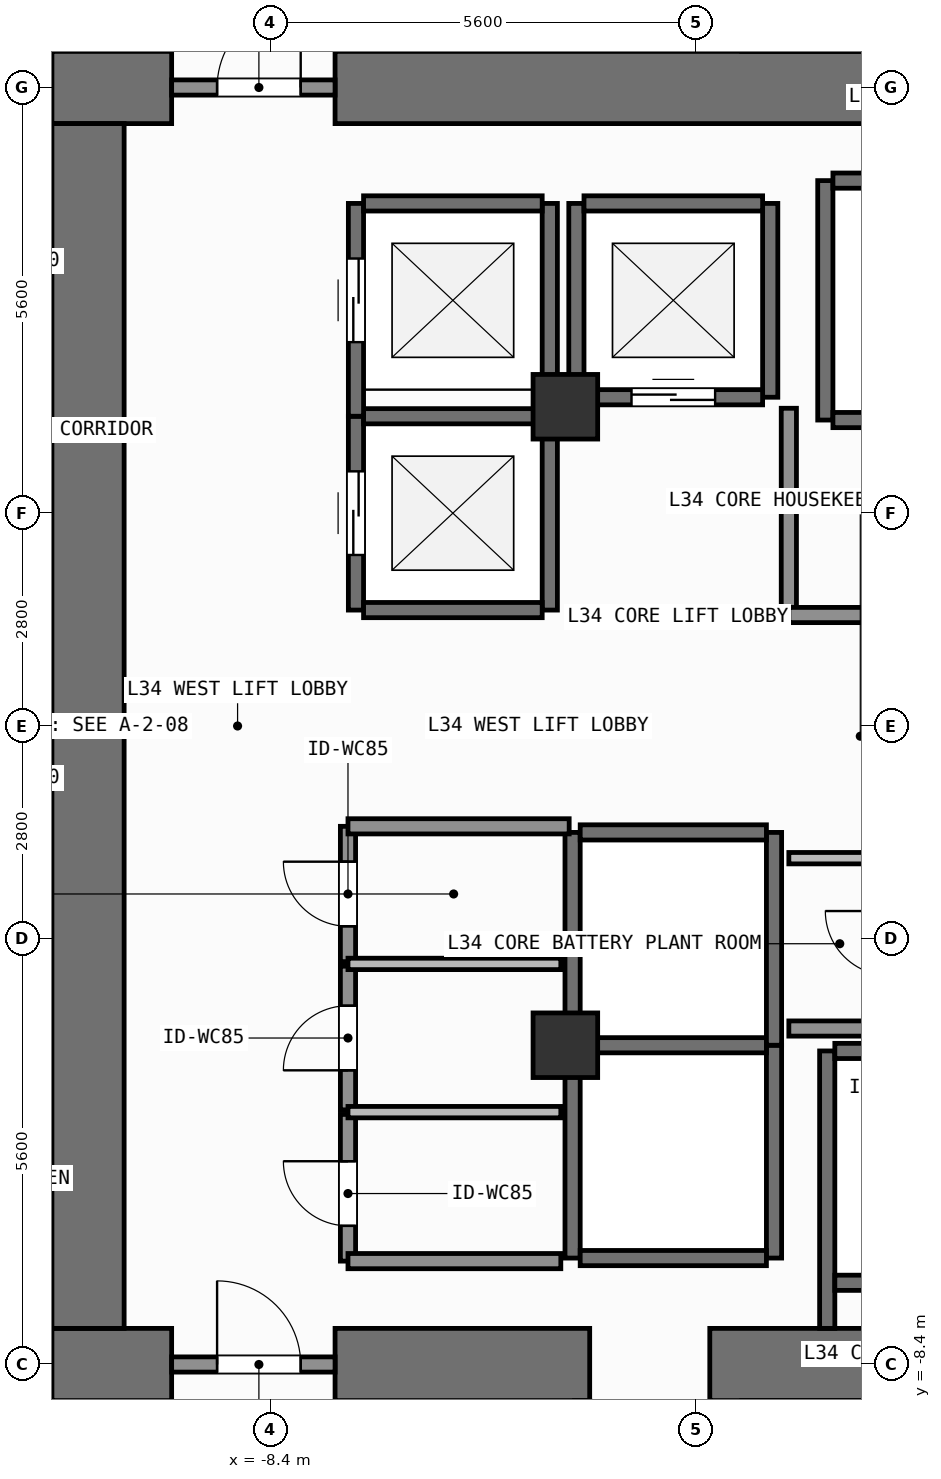
"""IFC4 building model, lengths in metres.
Left out: names, types, materials, properties, quantities, classifications, styles, units other than length and angle.
Written with IfcOpenShell. Run it as: python <this file> out.ifc"""

import sys

from ifc_helpers import new_model, si_unit, direction, frame, frame_2d, origin, origin_2d, place, context, subcontext, project, spatial, rectangle, extrude, element, fill, save


model = new_model("IFC4")
c1 = context("Model", 3, precision=1e-05, world=origin(), true_north=direction((0.0, 1.0)))
c2 = subcontext(c1, "Body", "Model", "MODEL_VIEW")
j1 = project(units=[si_unit("LENGTHUNIT", "METRE"), si_unit("PLANEANGLEUNIT", "RADIAN")], contexts=[c1])
p1 = place(None, origin())
s1 = spatial("IfcSite", under=j1, at=p1, CompositionType="ELEMENT")
p2 = place(p1, origin())
s2 = spatial("IfcBuilding", under=s1, at=p2, CompositionType="ELEMENT")
p3 = place(p2, frame((0.0, 0.0, 136.8)))
s3 = spatial("IfcBuildingStorey", under=s2, at=p3, CompositionType="ELEMENT", Elevation=136.8)
p4 = place(p3, frame((-11.275, -8.4, 0.0), z_axis=(0.0, 0.0, 1.0), x_axis=(1.0, 0.0, 0.0)))
e1 = element("IfcWall", 1, at=p4, inside=s3, PredefinedType="SHEAR", context=c2, shape_type="SweptSolid", body=[
    extrude(rectangle(XDim=1.575, YDim=0.95, at=frame_2d((0.788, 0.0))), origin(), (0.0, 0.0, 1.0), 3.9),
])
p5 = place(p3, frame((-7.55, -8.4, 0.0), z_axis=(0.0, 0.0, 1.0), x_axis=(1.0, 0.0, 0.0)))
e2 = element("IfcWall", 2, at=p5, inside=s3, PredefinedType="SHEAR", context=c2, shape_type="SweptSolid", body=[
    extrude(rectangle(XDim=3.35, YDim=0.95, at=frame_2d((1.675, 0.0))), origin(), (0.0, 0.0, 1.0), 3.9),
])
p6 = place(p3, frame((-2.62, -8.4, 0.0), z_axis=(0.0, 0.0, 1.0), x_axis=(1.0, 0.0, 0.0)))
e3 = element("IfcWall", 3, at=p6, inside=s3, PredefinedType="SHEAR", context=c2, shape_type="SweptSolid", body=[
    extrude(rectangle(XDim=7.27, YDim=0.95, at=frame_2d((3.635, 0.0))), origin(), (0.0, 0.0, 1.0), 3.9),
])
p7 = place(p3, frame((-11.275, 8.4, 0.0), z_axis=(0.0, 0.0, 1.0), x_axis=(1.0, 0.0, 0.0)))
e4 = element("IfcWall", 4, at=p7, inside=s3, PredefinedType="SHEAR", context=c2, shape_type="SweptSolid", body=[
    extrude(rectangle(XDim=1.575, YDim=0.95, at=frame_2d((0.788, 0.0))), origin(), (0.0, 0.0, 1.0), 3.9),
])
p8 = place(p3, frame((-7.55, 8.4, 0.0), z_axis=(0.0, 0.0, 1.0), x_axis=(1.0, 0.0, 0.0)))
e5 = element("IfcWall", 5, at=p8, inside=s3, PredefinedType="SHEAR", context=c2, shape_type="SweptSolid", body=[
    extrude(rectangle(XDim=16.425, YDim=0.95, at=frame_2d((8.212, 0.0))), origin(), (0.0, 0.0, 1.0), 3.9),
])
p9 = place(p3, frame((-10.8, -7.925, 0.0), z_axis=(0.0, 0.0, 1.0), x_axis=(0.0, 1.0, 0.0)))
e6 = element("IfcWall", 6, at=p9, inside=s3, PredefinedType="SHEAR", context=c2, shape_type="SweptSolid", body=[
    extrude(rectangle(XDim=15.85, YDim=0.95, at=frame_2d((7.925, 0.0))), origin(), (0.0, 0.0, 1.0), 3.9),
])
for number, where, z_axis, x_axis in (
    (7, (-4.52, -4.2, 0.0), (0.0, 0.0, 1.0), (1.0, 0.0, 0.0)),
    (8, (-4.52, 4.2, 0.0), (0.0, 0.0, 1.0), (1.0, 0.0, 0.0)),
):
    element("IfcColumn", number, at=place(p3, frame(where, z_axis=z_axis, x_axis=x_axis)), inside=s3, PredefinedType="COLUMN", context=c2, shape_type="SweptSolid", body=[
        extrude(rectangle(XDim=0.85, YDim=0.85, at=origin_2d()), origin(), (0.0, 0.0, 1.0), 3.9),
    ])
p10 = place(p3, frame((-7.275, 1.525, 0.0), z_axis=(0.0, 0.0, 1.0), x_axis=(0.0, 1.0, 0.0)))
e9 = element("IfcWall", 9, at=p10, inside=s3, PredefinedType="SHEAR", context=c2, shape_type="SweptSolid", body=[
    extrude(rectangle(XDim=2.55, YDim=0.2, at=frame_2d((1.275, 0.0))), origin(), (0.0, 0.0, 1.0), 3.68),
])
p11 = place(p10, frame((0.725, 0.0, 0.0)))
e10 = element("IfcOpeningElement", 10, at=p11, cuts=e9, PredefinedType="OPENING", context=c2, shape_type="SweptSolid", body=[
    extrude(rectangle(XDim=1.1, YDim=2.2, at=frame_2d((0.55, 1.1))), frame((0.0, 0.11, 0.0), z_axis=(0.0, -1.0, 0.0), x_axis=(1.0, 0.0, 0.0)), (0.0, 0.0, 1.0), 0.22),
])
p12 = place(p3, frame((-4.725, 1.525, 0.0), z_axis=(0.0, 0.0, 1.0), x_axis=(0.0, 1.0, 0.0)))
e11 = element("IfcWall", 11, at=p12, inside=s3, PredefinedType="SHEAR", context=c2, shape_type="SweptSolid", body=[
    extrude(rectangle(XDim=2.55, YDim=0.2, at=frame_2d((1.275, 0.0))), origin(), (0.0, 0.0, 1.0), 3.68),
])
for number, where, z_axis, x_axis in (
    (12, (-7.175, 1.525, 0.0), (0.0, 0.0, 1.0), (1.0, 0.0, 0.0)),
    (13, (-7.175, 4.075, 0.0), (0.0, 0.0, 1.0), (1.0, 0.0, 0.0)),
):
    element("IfcWall", number, at=place(p3, frame(where, z_axis=z_axis, x_axis=x_axis)), inside=s3, PredefinedType="SHEAR", context=c2, shape_type="SweptSolid", body=[
        extrude(rectangle(XDim=2.35, YDim=0.2, at=frame_2d((1.175, 0.0))), origin(), (0.0, 0.0, 1.0), 3.68),
    ])
p13 = place(p3, frame((-7.275, 4.075, 0.0), z_axis=(0.0, 0.0, 1.0), x_axis=(0.0, 1.0, 0.0)))
e14 = element("IfcWall", 14, at=p13, inside=s3, PredefinedType="SHEAR", context=c2, shape_type="SweptSolid", body=[
    extrude(rectangle(XDim=2.8, YDim=0.2, at=frame_2d((1.4, 0.0))), origin(), (0.0, 0.0, 1.0), 3.68),
])
p14 = place(p13, frame((0.975, 0.0, 0.0)))
e15 = element("IfcOpeningElement", 15, at=p14, cuts=e14, PredefinedType="OPENING", context=c2, shape_type="SweptSolid", body=[
    extrude(rectangle(XDim=1.1, YDim=2.2, at=frame_2d((0.55, 1.1))), frame((0.0, 0.11, 0.0), z_axis=(0.0, -1.0, 0.0), x_axis=(1.0, 0.0, 0.0)), (0.0, 0.0, 1.0), 0.22),
])
p15 = place(p3, frame((-4.725, 4.075, 0.0), z_axis=(0.0, 0.0, 1.0), x_axis=(0.0, 1.0, 0.0)))
e16 = element("IfcWall", 16, at=p15, inside=s3, PredefinedType="SHEAR", context=c2, shape_type="SweptSolid", body=[
    extrude(rectangle(XDim=2.8, YDim=0.2, at=frame_2d((1.4, 0.0))), origin(), (0.0, 0.0, 1.0), 3.68),
])
p16 = place(p3, frame((-7.175, 6.875, 0.0), z_axis=(0.0, 0.0, 1.0), x_axis=(1.0, 0.0, 0.0)))
e17 = element("IfcWall", 17, at=p16, inside=s3, PredefinedType="SHEAR", context=c2, shape_type="SweptSolid", body=[
    extrude(rectangle(XDim=2.35, YDim=0.2, at=frame_2d((1.175, 0.0))), origin(), (0.0, 0.0, 1.0), 3.68),
])
for number, where, z_axis, x_axis in (
    (18, (-4.375, 4.325, 0.0), (0.0, 0.0, 1.0), (0.0, 1.0, 0.0)),
    (19, (-1.825, 4.325, 0.0), (0.0, 0.0, 1.0), (0.0, 1.0, 0.0)),
):
    element("IfcWall", number, at=place(p3, frame(where, z_axis=z_axis, x_axis=x_axis)), inside=s3, PredefinedType="SHEAR", context=c2, shape_type="SweptSolid", body=[
        extrude(rectangle(XDim=2.55, YDim=0.2, at=frame_2d((1.275, 0.0))), origin(), (0.0, 0.0, 1.0), 3.68),
    ])
p17 = place(p3, frame((-4.275, 4.325, 0.0), z_axis=(0.0, 0.0, 1.0), x_axis=(1.0, 0.0, 0.0)))
e20 = element("IfcWall", 20, at=p17, inside=s3, PredefinedType="SHEAR", context=c2, shape_type="SweptSolid", body=[
    extrude(rectangle(XDim=2.35, YDim=0.2, at=frame_2d((1.175, 0.0))), origin(), (0.0, 0.0, 1.0), 3.68),
])
p18 = place(p17, frame((0.625, 0.0, 0.0)))
e21 = element("IfcOpeningElement", 21, at=p18, cuts=e20, PredefinedType="OPENING", context=c2, shape_type="SweptSolid", body=[
    extrude(rectangle(XDim=1.1, YDim=2.2, at=frame_2d((0.55, 1.1))), frame((0.0, 0.11, 0.0), z_axis=(0.0, -1.0, 0.0), x_axis=(1.0, 0.0, 0.0)), (0.0, 0.0, 1.0), 0.22),
])
p19 = place(p3, frame((-4.275, 6.875, 0.0), z_axis=(0.0, 0.0, 1.0), x_axis=(1.0, 0.0, 0.0)))
e22 = element("IfcWall", 22, at=p19, inside=s3, PredefinedType="SHEAR", context=c2, shape_type="SweptSolid", body=[
    extrude(rectangle(XDim=2.35, YDim=0.2, at=frame_2d((1.175, 0.0))), origin(), (0.0, 0.0, 1.0), 3.68),
])
for number, where, z_axis, x_axis in (
    (23, (-4.425, -7.0, 0.0), (0.0, 0.0, 1.0), (0.0, 1.0, 0.0)),
    (24, (-1.775, -7.0, 0.0), (0.0, 0.0, 1.0), (0.0, 1.0, 0.0)),
):
    element("IfcWall", number, at=place(p3, frame(where, z_axis=z_axis, x_axis=x_axis)), inside=s3, PredefinedType="SHEAR", context=c2, shape_type="SweptSolid", body=[
        extrude(rectangle(XDim=2.8, YDim=0.2, at=frame_2d((1.4, 0.0))), origin(), (0.0, 0.0, 1.0), 3.68),
    ])
for number, where, z_axis, x_axis in (
    (25, (-4.325, -7.0, 0.0), (0.0, 0.0, 1.0), (1.0, 0.0, 0.0)),
    (26, (-4.325, -4.2, 0.0), (0.0, 0.0, 1.0), (1.0, 0.0, 0.0)),
):
    element("IfcWall", number, at=place(p3, frame(where, z_axis=z_axis, x_axis=x_axis)), inside=s3, PredefinedType="SHEAR", context=c2, shape_type="SweptSolid", body=[
        extrude(rectangle(XDim=2.45, YDim=0.2, at=frame_2d((1.225, 0.0))), origin(), (0.0, 0.0, 1.0), 3.68),
    ])
for number, where, z_axis, x_axis in (
    (27, (-4.425, -4.2, 0.0), (0.0, 0.0, 1.0), (0.0, 1.0, 0.0)),
    (28, (-1.775, -4.2, 0.0), (0.0, 0.0, 1.0), (0.0, 1.0, 0.0)),
):
    element("IfcWall", number, at=place(p3, frame(where, z_axis=z_axis, x_axis=x_axis)), inside=s3, PredefinedType="SHEAR", context=c2, shape_type="SweptSolid", body=[
        extrude(rectangle(XDim=2.8, YDim=0.2, at=frame_2d((1.4, 0.0))), origin(), (0.0, 0.0, 1.0), 3.68),
    ])
p20 = place(p3, frame((-4.325, -1.4, 0.0), z_axis=(0.0, 0.0, 1.0), x_axis=(1.0, 0.0, 0.0)))
e29 = element("IfcWall", 29, at=p20, inside=s3, PredefinedType="SHEAR", context=c2, shape_type="SweptSolid", body=[
    extrude(rectangle(XDim=2.45, YDim=0.2, at=frame_2d((1.225, 0.0))), origin(), (0.0, 0.0, 1.0), 3.68),
])
p21 = place(p3, frame((-1.1, 4.025, 0.0), z_axis=(0.0, 0.0, 1.0), x_axis=(0.0, 1.0, 0.0)))
e30 = element("IfcWall", 30, at=p21, inside=s3, PredefinedType="SHEAR", context=c2, shape_type="SweptSolid", body=[
    extrude(rectangle(XDim=3.15, YDim=0.2, at=frame_2d((1.575, 0.0))), origin(), (0.0, 0.0, 1.0), 3.68),
])
for number, where, z_axis, x_axis in (
    (31, (-1.0, 4.025, 0.0), (0.0, 0.0, 1.0), (1.0, 0.0, 0.0)),
    (32, (-1.0, 7.175, 0.0), (0.0, 0.0, 1.0), (1.0, 0.0, 0.0)),
):
    element("IfcWall", number, at=place(p3, frame(where, z_axis=z_axis, x_axis=x_axis)), inside=s3, PredefinedType="SHEAR", context=c2, shape_type="SweptSolid", body=[
        extrude(rectangle(XDim=2.4, YDim=0.2, at=frame_2d((1.2, 0.0))), origin(), (0.0, 0.0, 1.0), 3.68),
    ])
p22 = place(p3, frame((-1.075, -7.925, 0.0), z_axis=(0.0, 0.0, 1.0), x_axis=(0.0, 1.0, 0.0)))
e33 = element("IfcWall", 33, at=p22, inside=s3, PredefinedType="SHEAR", context=c2, shape_type="SweptSolid", body=[
    extrude(rectangle(XDim=3.65, YDim=0.2, at=frame_2d((1.825, 0.0))), origin(), (0.0, 0.0, 1.0), 3.68),
])
for number, where, z_axis, x_axis in (
    (34, (-0.975, -7.325, 0.0), (0.0, 0.0, 1.0), (1.0, 0.0, 0.0)),
    (35, (-0.975, -4.275, 0.0), (0.0, 0.0, 1.0), (1.0, 0.0, 0.0)),
):
    element("IfcWall", number, at=place(p3, frame(where, z_axis=z_axis, x_axis=x_axis)), inside=s3, PredefinedType="SHEAR", context=c2, shape_type="SweptSolid", body=[
        extrude(rectangle(XDim=2.35, YDim=0.2, at=frame_2d((1.175, 0.0))), origin(), (0.0, 0.0, 1.0), 3.68),
    ])
p23 = place(p3, frame((-9.7, -8.4, 0.0), z_axis=(0.0, 0.0, 1.0), x_axis=(1.0, 0.0, 0.0)))
e36 = element("IfcWall", 36, at=p23, inside=s3, PredefinedType="SOLIDWALL", context=c2, shape_type="SweptSolid", body=[
    extrude(rectangle(XDim=2.15, YDim=0.2, at=frame_2d((1.075, 0.0))), origin(), (0.0, 0.0, 1.0), 2.72),
])
p24 = place(p23, frame((0.598, 0.0, 0.0)))
e37 = element("IfcOpeningElement", 37, at=p24, cuts=e36, PredefinedType="OPENING", context=c2, shape_type="SweptSolid", body=[
    extrude(rectangle(XDim=1.1, YDim=2.15, at=frame_2d((0.55, 1.075))), frame((0.0, 0.11, 0.0), z_axis=(0.0, -1.0, 0.0), x_axis=(1.0, 0.0, 0.0)), (0.0, 0.0, 1.0), 0.22),
])
p25 = place(p3, frame((-9.7, 8.4, 0.0), z_axis=(0.0, 0.0, 1.0), x_axis=(1.0, 0.0, 0.0)))
e38 = element("IfcWall", 38, at=p25, inside=s3, PredefinedType="SOLIDWALL", context=c2, shape_type="SweptSolid", body=[
    extrude(rectangle(XDim=2.15, YDim=0.2, at=frame_2d((1.075, 0.0))), origin(), (0.0, 0.0, 1.0), 2.72),
])
p26 = place(p25, frame((0.598, 0.0, 0.0)))
e39 = element("IfcOpeningElement", 39, at=p26, cuts=e38, PredefinedType="OPENING", context=c2, shape_type="SweptSolid", body=[
    extrude(rectangle(XDim=1.1, YDim=2.15, at=frame_2d((0.55, 1.075))), frame((0.0, 0.11, 0.0), z_axis=(0.0, -1.0, 0.0), x_axis=(1.0, 0.0, 0.0)), (0.0, 0.0, 1.0), 0.22),
])
p27 = place(p3, frame((-7.38, -7.04, 0.0), z_axis=(0.0, 0.0, 1.0), x_axis=(0.0, 1.0, 0.0)))
e40 = element("IfcWall", 40, at=p27, inside=s3, PredefinedType="SOLIDWALL", context=c2, shape_type="SweptSolid", body=[
    extrude(rectangle(XDim=1.93, YDim=0.2, at=frame_2d((0.965, 0.0))), origin(), (0.0, 0.0, 1.0), 3.68),
])
p28 = place(p27, frame((0.464, 0.0, 0.0)))
e41 = element("IfcOpeningElement", 41, at=p28, cuts=e40, PredefinedType="OPENING", context=c2, shape_type="SweptSolid", body=[
    extrude(rectangle(XDim=0.85, YDim=2.1, at=frame_2d((0.425, 1.05))), frame((0.0, 0.11, 0.0), z_axis=(0.0, -1.0, 0.0), x_axis=(1.0, 0.0, 0.0)), (0.0, 0.0, 1.0), 0.22),
])
p29 = place(p3, frame((-7.38, -5.05, 0.0), z_axis=(0.0, 0.0, 1.0), x_axis=(0.0, 1.0, 0.0)))
e42 = element("IfcWall", 42, at=p29, inside=s3, PredefinedType="SOLIDWALL", context=c2, shape_type="SweptSolid", body=[
    extrude(rectangle(XDim=1.89, YDim=0.2, at=frame_2d((0.945, 0.0))), origin(), (0.0, 0.0, 1.0), 3.68),
])
p30 = place(p29, frame((0.52, 0.0, 0.0)))
e43 = element("IfcOpeningElement", 43, at=p30, cuts=e42, PredefinedType="OPENING", context=c2, shape_type="SweptSolid", body=[
    extrude(rectangle(XDim=0.85, YDim=2.1, at=frame_2d((0.425, 1.05))), frame((0.0, 0.11, 0.0), z_axis=(0.0, -1.0, 0.0), x_axis=(1.0, 0.0, 0.0)), (0.0, 0.0, 1.0), 0.22),
])
p31 = place(p3, frame((-7.38, -3.1, 0.0), z_axis=(0.0, 0.0, 1.0), x_axis=(0.0, 1.0, 0.0)))
e44 = element("IfcWall", 44, at=p31, inside=s3, PredefinedType="SOLIDWALL", context=c2, shape_type="SweptSolid", body=[
    extrude(rectangle(XDim=1.78, YDim=0.2, at=frame_2d((0.89, 0.0))), origin(), (0.0, 0.0, 1.0), 3.68),
])
p32 = place(p31, frame((0.465, 0.0, 0.0)))
e45 = element("IfcOpeningElement", 45, at=p32, cuts=e44, PredefinedType="OPENING", context=c2, shape_type="SweptSolid", body=[
    extrude(rectangle(XDim=0.85, YDim=2.1, at=frame_2d((0.425, 1.05))), frame((0.0, 0.11, 0.0), z_axis=(0.0, -1.0, 0.0), x_axis=(1.0, 0.0, 0.0)), (0.0, 0.0, 1.0), 0.22),
])
p33 = place(p3, frame((-7.38, -1.32, 0.0), z_axis=(0.0, 0.0, 1.0), x_axis=(1.0, 0.0, 0.0)))
e46 = element("IfcWall", 46, at=p33, inside=s3, PredefinedType="SOLIDWALL", context=c2, shape_type="SweptSolid", body=[
    extrude(rectangle(XDim=2.91, YDim=0.2, at=frame_2d((1.455, 0.0))), origin(), (0.0, 0.0, 1.0), 3.68),
])
p34 = place(p3, frame((-1.58, 1.48, 0.0), z_axis=(0.0, 0.0, 1.0), x_axis=(0.0, 1.0, 0.0)))
e47 = element("IfcWall", 47, at=p34, inside=s3, PredefinedType="SOLIDWALL", context=c2, shape_type="SweptSolid", body=[
    extrude(rectangle(XDim=2.7, YDim=0.2, at=frame_2d((1.35, 0.0))), origin(), (0.0, 0.0, 1.0), 3.68),
])
for number, where, z_axis, x_axis in (
    (48, (-1.58, -3.98, 0.0), (0.0, 0.0, 1.0), (1.0, 0.0, 0.0)),
    (49, (-1.58, 1.46, 0.0), (0.0, 0.0, 1.0), (1.0, 0.0, 0.0)),
):
    element("IfcWall", number, at=place(p3, frame(where, z_axis=z_axis, x_axis=x_axis)), inside=s3, PredefinedType="SOLIDWALL", context=c2, shape_type="SweptSolid", body=[
        extrude(rectangle(XDim=3.19, YDim=0.2, at=frame_2d((1.595, 0.0))), origin(), (0.0, 0.0, 1.0), 3.68),
    ])
p35 = place(p3, frame((-1.58, -1.739, 0.0), z_axis=(0.0, 0.0, 1.0), x_axis=(1.0, 0.0, 0.0)))
e50 = element("IfcWall", 50, at=p35, inside=s3, PredefinedType="PARTITIONING", context=c2, shape_type="SweptSolid", body=[
    extrude(rectangle(XDim=3.19, YDim=0.15, at=frame_2d((1.595, 0.0))), origin(), (0.0, 0.0, 1.0), 3.68),
])
p36 = place(p3, frame((-7.38, -7.04, 0.0), z_axis=(0.0, 0.0, 1.0), x_axis=(1.0, 0.0, 0.0)))
e51 = element("IfcWall", 51, at=p36, inside=s3, PredefinedType="SOLIDWALL", context=c2, shape_type="SweptSolid", body=[
    extrude(rectangle(XDim=2.8, YDim=0.2, at=frame_2d((1.4, 0.0))), origin(), (0.0, 0.0, 1.0), 3.68),
])
for number, where, z_axis, x_axis in (
    (52, (-7.38, -5.08, 0.0), (0.0, 0.0, 1.0), (1.0, 0.0, 0.0)),
    (53, (-7.38, -3.13, 0.0), (0.0, 0.0, 1.0), (1.0, 0.0, 0.0)),
):
    element("IfcWall", number, at=place(p3, frame(where, z_axis=z_axis, x_axis=x_axis)), inside=s3, PredefinedType="PARTITIONING", context=c2, shape_type="SweptSolid", body=[
        extrude(rectangle(XDim=2.8, YDim=0.15, at=frame_2d((1.4, 0.0))), origin(), (0.0, 0.0, 1.0), 3.68),
    ])
p37 = place(p11, origin())
e54 = element("IfcDoor", 54, at=p37, inside=s3, OperationType="SLIDING_TO_LEFT", PredefinedType="DOOR", context=c2, shape_type="SweptSolid", body=[
    extrude(rectangle(XDim=1.1, YDim=2.2, at=frame_2d((0.55, 1.1))), frame((0.0, 0.025, 0.0), z_axis=(0.0, -1.0, 0.0), x_axis=(1.0, 0.0, 0.0)), (0.0, 0.0, 1.0), 0.05),
])
fill(e10, e54)
p38 = place(p14, origin())
e55 = element("IfcDoor", 55, at=p38, inside=s3, OperationType="SLIDING_TO_LEFT", PredefinedType="DOOR", context=c2, shape_type="SweptSolid", body=[
    extrude(rectangle(XDim=1.1, YDim=2.2, at=frame_2d((0.55, 1.1))), frame((0.0, 0.025, 0.0), z_axis=(0.0, -1.0, 0.0), x_axis=(1.0, 0.0, 0.0)), (0.0, 0.0, 1.0), 0.05),
])
fill(e15, e55)
p39 = place(p18, origin())
e56 = element("IfcDoor", 56, at=p39, inside=s3, OperationType="SLIDING_TO_LEFT", PredefinedType="DOOR", context=c2, shape_type="SweptSolid", body=[
    extrude(rectangle(XDim=1.1, YDim=2.2, at=frame_2d((0.55, 1.1))), frame((0.0, 0.025, 0.0), z_axis=(0.0, -1.0, 0.0), x_axis=(1.0, 0.0, 0.0)), (0.0, 0.0, 1.0), 0.05),
])
fill(e21, e56)
p40 = place(p24, origin())
e57 = element("IfcDoor", 57, at=p40, inside=s3, OperationType="SINGLE_SWING_LEFT", PredefinedType="DOOR", context=c2, shape_type="SweptSolid", body=[
    extrude(rectangle(XDim=1.1, YDim=2.15, at=frame_2d((0.55, 1.075))), frame((0.0, 0.025, 0.0), z_axis=(0.0, -1.0, 0.0), x_axis=(1.0, 0.0, 0.0)), (0.0, 0.0, 1.0), 0.05),
])
fill(e37, e57)
p41 = place(p26, origin())
e58 = element("IfcDoor", 58, at=p41, inside=s3, OperationType="SINGLE_SWING_RIGHT", PredefinedType="DOOR", context=c2, shape_type="SweptSolid", body=[
    extrude(rectangle(XDim=1.1, YDim=2.15, at=frame_2d((0.55, 1.075))), frame((0.0, 0.025, 0.0), z_axis=(0.0, -1.0, 0.0), x_axis=(1.0, 0.0, 0.0)), (0.0, 0.0, 1.0), 0.05),
])
fill(e39, e58)
p42 = place(p28, origin())
e59 = element("IfcDoor", 59, at=p42, inside=s3, OperationType="SINGLE_SWING_RIGHT", PredefinedType="DOOR", context=c2, shape_type="SweptSolid", body=[
    extrude(rectangle(XDim=0.85, YDim=2.1, at=frame_2d((0.425, 1.05))), frame((0.0, 0.025, 0.0), z_axis=(0.0, -1.0, 0.0), x_axis=(1.0, 0.0, 0.0)), (0.0, 0.0, 1.0), 0.05),
])
fill(e41, e59)
p43 = place(p30, origin())
e60 = element("IfcDoor", 60, at=p43, inside=s3, OperationType="SINGLE_SWING_LEFT", PredefinedType="DOOR", context=c2, shape_type="SweptSolid", body=[
    extrude(rectangle(XDim=0.85, YDim=2.1, at=frame_2d((0.425, 1.05))), frame((0.0, 0.025, 0.0), z_axis=(0.0, -1.0, 0.0), x_axis=(1.0, 0.0, 0.0)), (0.0, 0.0, 1.0), 0.05),
])
fill(e43, e60)
p44 = place(p32, origin())
e61 = element("IfcDoor", 61, at=p44, inside=s3, OperationType="SINGLE_SWING_RIGHT", PredefinedType="DOOR", context=c2, shape_type="SweptSolid", body=[
    extrude(rectangle(XDim=0.85, YDim=2.1, at=frame_2d((0.425, 1.05))), frame((0.0, 0.025, 0.0), z_axis=(0.0, -1.0, 0.0), x_axis=(1.0, 0.0, 0.0)), (0.0, 0.0, 1.0), 0.05),
])
fill(e45, e61)
save(model, sys.argv[1])
